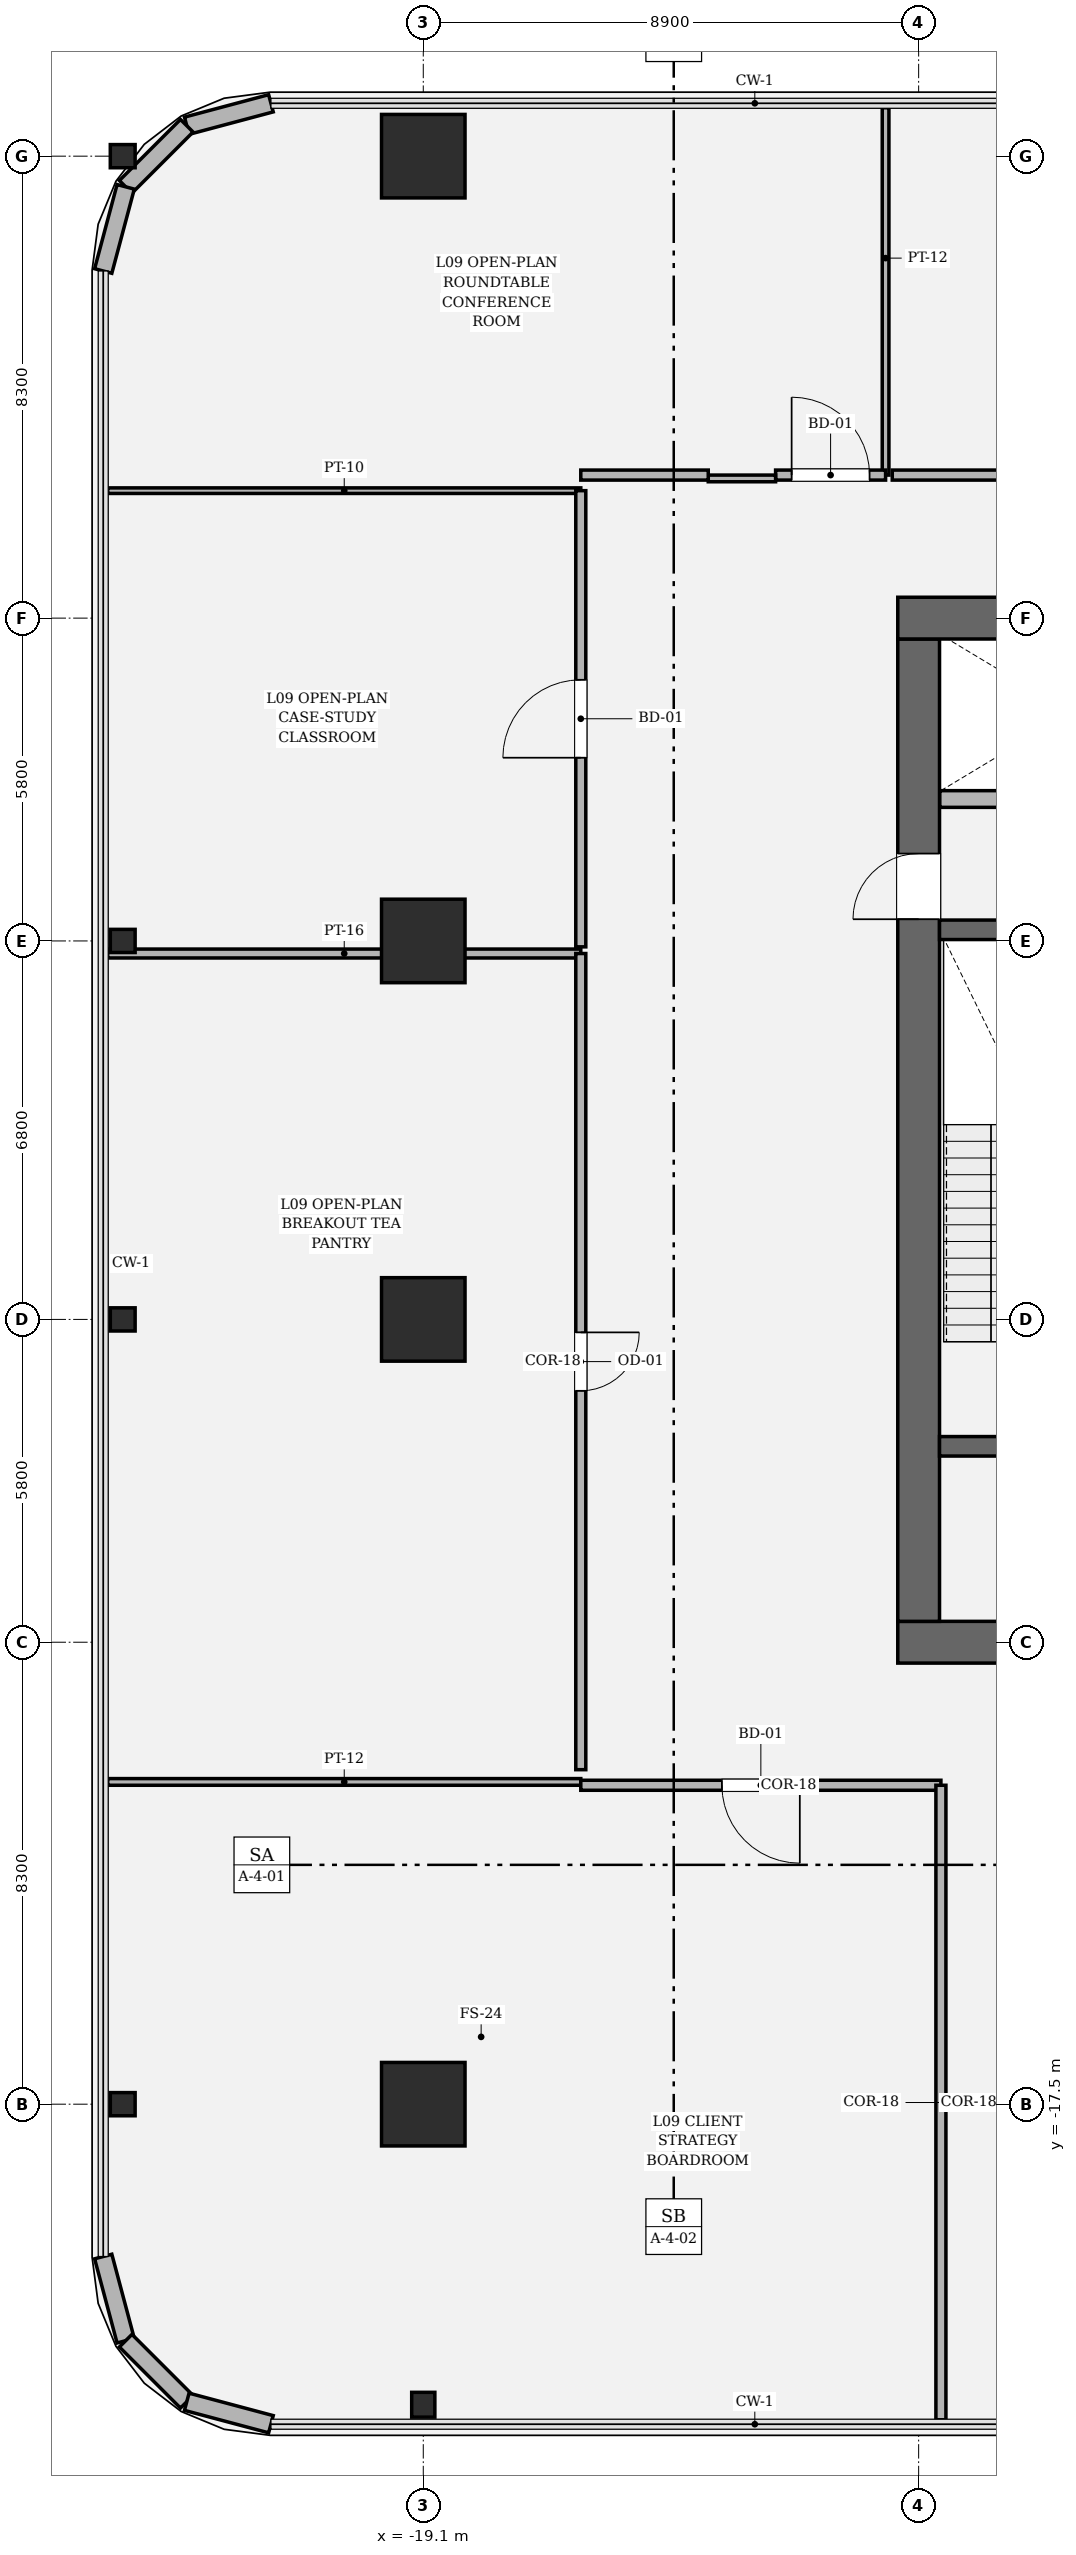
"""IFC4 building model, lengths in metres.
Left out: names, types, materials, properties, quantities, classifications, styles, units other than length and angle.
Written with IfcOpenShell. Run it as: python <this file> out.ifc"""

import sys

from ifc_helpers import new_model, si_unit, direction, frame, frame_2d, origin, origin_2d, place, context, subcontext, project, spatial, rectangle, hollow_rectangle, i_section, extrude, element, fill, save


model = new_model("IFC4")
c1 = context("Model", 3, precision=1e-05, world=origin(), true_north=direction((0.0, 1.0)))
c2 = subcontext(c1, "Body", "Model", "MODEL_VIEW")
j1 = project(units=[si_unit("LENGTHUNIT", "METRE"), si_unit("PLANEANGLEUNIT", "RADIAN")], contexts=[c1])
p1 = place(None, origin())
s1 = spatial("IfcSite", under=j1, at=p1, CompositionType="ELEMENT")
p2 = place(p1, origin())
s2 = spatial("IfcBuilding", under=s1, at=p2, CompositionType="ELEMENT")
p3 = place(p2, frame((0.0, 0.0, 44.4)))
s3 = spatial("IfcBuildingStorey", under=s2, at=p3, CompositionType="ELEMENT", Elevation=44.4)
p4 = place(p3, frame((10.575, -9.2, 0.0), z_axis=(0.0, 0.0, 1.0), x_axis=(-1.0, 0.0, 0.0)))
e1 = element("IfcWall", 1, at=p4, inside=s3, PredefinedType="SHEAR", context=c2, shape_type="SweptSolid", body=[
    extrude(rectangle(XDim=21.15, YDim=0.75, at=frame_2d((10.575, 0.0))), origin(), (0.0, 0.0, 1.0), 4.05),
])
p5 = place(p4, frame((2.85, 0.0, 0.0)))
e2 = element("IfcOpeningElement", 2, at=p5, cuts=e1, PredefinedType="OPENING", context=c2, shape_type="SweptSolid", body=[
    extrude(rectangle(XDim=1.25, YDim=2.25, at=frame_2d((0.625, 1.125))), frame((0.0, 0.385, 0.0), z_axis=(0.0, -1.0, 0.0), x_axis=(1.0, 0.0, 0.0)), (0.0, 0.0, 1.0), 0.77),
])
p6 = place(p4, frame((17.05, 0.0, 0.0)))
e3 = element("IfcOpeningElement", 3, at=p6, cuts=e1, PredefinedType="OPENING", context=c2, shape_type="SweptSolid", body=[
    extrude(rectangle(XDim=1.25, YDim=2.25, at=frame_2d((0.625, 1.125))), frame((0.0, 0.385, 0.0), z_axis=(0.0, -1.0, 0.0), x_axis=(1.0, 0.0, 0.0)), (0.0, 0.0, 1.0), 0.77),
])
p7 = place(p3, frame((-10.2, -8.825, 0.0), z_axis=(0.0, 0.0, 1.0), x_axis=(0.0, 1.0, 0.0)))
e4 = element("IfcWall", 4, at=p7, inside=s3, PredefinedType="SHEAR", context=c2, shape_type="SweptSolid", body=[
    extrude(rectangle(XDim=17.65, YDim=0.75, at=frame_2d((8.825, 0.0))), origin(), (0.0, 0.0, 1.0), 4.05),
])
p8 = place(p7, frame((12.615, 0.0, 0.0)))
e5 = element("IfcOpeningElement", 5, at=p8, cuts=e4, PredefinedType="OPENING", context=c2, shape_type="SweptSolid", body=[
    extrude(rectangle(XDim=1.18, YDim=2.2, at=frame_2d((0.59, 1.1))), frame((0.0, 0.385, 0.0), z_axis=(0.0, -1.0, 0.0), x_axis=(1.0, 0.0, 0.0)), (0.0, 0.0, 1.0), 0.77),
])
p9 = place(p3, frame((-10.575, 9.2, 0.0), z_axis=(0.0, 0.0, 1.0), x_axis=(1.0, 0.0, 0.0)))
e6 = element("IfcWall", 6, at=p9, inside=s3, PredefinedType="SHEAR", context=c2, shape_type="SweptSolid", body=[
    extrude(rectangle(XDim=21.15, YDim=0.75, at=frame_2d((10.575, 0.0))), origin(), (0.0, 0.0, 1.0), 4.05),
])
p10 = place(p3, frame((-9.825, -5.68, 0.0), z_axis=(0.0, 0.0, 1.0), x_axis=(1.0, 0.0, 0.0)))
e7 = element("IfcWall", 7, at=p10, inside=s3, PredefinedType="SOLIDWALL", context=c2, shape_type="SweptSolid", body=[
    extrude(rectangle(XDim=5.175, YDim=0.35, at=frame_2d((2.587, 0.0))), origin(), (0.0, 0.0, 1.0), 4.05),
])
p11 = place(p10, frame((1.285, 0.0, 0.0)))
e8 = element("IfcOpeningElement", 8, at=p11, cuts=e7, PredefinedType="OPENING", context=c2, shape_type="SweptSolid", body=[
    extrude(rectangle(XDim=1.18, YDim=2.2, at=frame_2d((0.59, 1.1))), frame((0.0, 0.185, 0.0), z_axis=(0.0, -1.0, 0.0), x_axis=(1.0, 0.0, 0.0)), (0.0, 0.0, 1.0), 0.37),
])
p12 = place(p3, frame((-9.825, 3.6, 0.0), z_axis=(0.0, 0.0, 1.0), x_axis=(1.0, 0.0, 0.0)))
e9 = element("IfcWall", 9, at=p12, inside=s3, PredefinedType="SOLIDWALL", context=c2, shape_type="SweptSolid", body=[
    extrude(rectangle(XDim=5.175, YDim=0.35, at=frame_2d((2.587, 0.0))), origin(), (0.0, 0.0, 1.0), 4.05),
])
for number, where, z_axis, x_axis in (
    (10, (-19.1, -17.5, 0.0), (0.0, 0.0, 1.0), (1.0, 0.0, 0.0)),
    (11, (-19.1, 17.5, 0.0), (0.0, 0.0, 1.0), (1.0, 0.0, 0.0)),
    (12, (-19.1, 3.4, 0.0), (0.0, 0.0, 1.0), (1.0, 0.0, 0.0)),
    (13, (-19.1, -3.4, 0.0), (0.0, 0.0, 1.0), (1.0, 0.0, 0.0)),
):
    element("IfcColumn", number, at=place(p3, frame(where, z_axis=z_axis, x_axis=x_axis)), inside=s3, PredefinedType="COLUMN", context=c2, shape_type="SweptSolid", body=[
        extrude(hollow_rectangle(XDim=1.5, YDim=1.5, WallThickness=0.045, at=origin_2d()), origin(), (0.0, 0.0, 1.0), 4.05),
    ])
for number, where, z_axis, x_axis in (
    (14, (-19.1, -22.9, 0.0), (0.0, 0.0, 1.0), (1.0, 0.0, 0.0)),
    (15, (-24.5, -17.5, 0.0), (0.0, 0.0, 1.0), (0.0, 1.0, 0.0)),
    (16, (-24.5, -3.4, 0.0), (0.0, 0.0, 1.0), (0.0, 1.0, 0.0)),
    (17, (-24.5, 3.4, 0.0), (0.0, 0.0, 1.0), (0.0, 1.0, 0.0)),
    (18, (-24.5, 17.5, 0.0), (0.0, 0.0, 1.0), (0.0, 1.0, 0.0)),
):
    element("IfcColumn", number, at=place(p3, frame(where, z_axis=z_axis, x_axis=x_axis)), inside=s3, PredefinedType="COLUMN", context=c2, shape_type="SweptSolid", body=[
        extrude(i_section(OverallWidth=0.416, OverallDepth=0.446, WebThickness=0.039, FlangeThickness=0.062, FilletRadius=0.018, at=origin_2d()), origin(), (0.0, 0.0, 1.0), 4.048),
    ])
p13 = place(p3, frame((-21.837, 18.45, 0.0), z_axis=(0.0, 0.0, 1.0), x_axis=(-0.966224582397, -0.257701486942, 0.0)))
e19 = element("IfcWall", 19, at=p13, inside=s3, PredefinedType="SOLIDWALL", context=c2, shape_type="SweptSolid", body=[
    extrude(rectangle(XDim=1.565, YDim=0.32, at=frame_2d((0.783, 0.0))), origin(), (0.0, 0.0, 1.0), 3.81),
])
p14 = place(p3, frame((-23.349, 18.047, 0.0), z_axis=(0.0, 0.0, 1.0), x_axis=(-0.707106781187, -0.707106781187, 0.0)))
e20 = element("IfcWall", 20, at=p14, inside=s3, PredefinedType="SOLIDWALL", context=c2, shape_type="SweptSolid", body=[
    extrude(rectangle(XDim=1.552, YDim=0.32, at=frame_2d((0.776, 0.0))), origin(), (0.0, 0.0, 1.0), 2.484),
])
p15 = place(p3, frame((-24.447, 16.949, 0.0), z_axis=(0.0, 0.0, 1.0), x_axis=(-0.257847112249, -0.966185730957, 0.0)))
e21 = element("IfcWall", 21, at=p15, inside=s3, PredefinedType="SOLIDWALL", context=c2, shape_type="SweptSolid", body=[
    extrude(rectangle(XDim=1.565, YDim=0.32, at=frame_2d((0.783, 0.0))), origin(), (0.0, 0.0, 1.0), 2.524),
])
p16 = place(p3, frame((-24.85, -20.237, 0.0), z_axis=(0.0, 0.0, 1.0), x_axis=(0.257847112249, -0.966185730957, 0.0)))
e22 = element("IfcWall", 22, at=p16, inside=s3, PredefinedType="SOLIDWALL", context=c2, shape_type="SweptSolid", body=[
    extrude(rectangle(XDim=1.565, YDim=0.32, at=frame_2d((0.783, 0.0))), origin(), (0.0, 0.0, 1.0), 3.81),
])
p17 = place(p3, frame((-24.447, -21.749, 0.0), z_axis=(0.0, 0.0, 1.0), x_axis=(0.707028130747, -0.707185422879, 0.0)))
e23 = element("IfcWall", 23, at=p17, inside=s3, PredefinedType="SOLIDWALL", context=c2, shape_type="SweptSolid", body=[
    extrude(rectangle(XDim=1.552, YDim=0.32, at=frame_2d((0.776, 0.0))), origin(), (0.0, 0.0, 1.0), 3.81),
])
p18 = place(p3, frame((-23.349, -22.847, 0.0), z_axis=(0.0, 0.0, 1.0), x_axis=(0.966224582397, -0.257701486942, 0.0)))
e24 = element("IfcWall", 24, at=p18, inside=s3, PredefinedType="SOLIDWALL", context=c2, shape_type="SweptSolid", body=[
    extrude(rectangle(XDim=1.565, YDim=0.32, at=frame_2d((0.783, 0.0))), origin(), (0.0, 0.0, 1.0), 3.81),
])
p19 = place(p3, frame((-9.82, 5.95, 0.0), z_axis=(0.0, 0.0, 1.0), x_axis=(1.0, 0.0, 0.0)))
e25 = element("IfcWall", 25, at=p19, inside=s3, PredefinedType="SOLIDWALL", context=c2, shape_type="SweptSolid", body=[
    extrude(rectangle(XDim=4.76, YDim=0.3, at=frame_2d((2.38, 0.0))), origin(), (0.0, 0.0, 1.0), 3.81),
])
p20 = place(p3, frame((-24.77, -11.71, 0.0), z_axis=(0.0, 0.0, 1.0), x_axis=(1.0, 0.0, 0.0)))
e26 = element("IfcWall", 26, at=p20, inside=s3, PredefinedType="PARTITIONING", context=c2, shape_type="SweptSolid", body=[
    extrude(rectangle(XDim=8.5, YDim=0.12, at=frame_2d((4.25, 0.0))), origin(), (0.0, 0.0, 1.0), 2.524),
])
p21 = place(p3, frame((-16.27, -11.77, 0.0), z_axis=(0.0, 0.0, 1.0), x_axis=(1.0, 0.0, 0.0)))
e27 = element("IfcWall", 27, at=p21, inside=s3, PredefinedType="PARTITIONING", context=c2, shape_type="SweptSolid", body=[
    extrude(rectangle(XDim=6.47, YDim=0.18, at=frame_2d((3.235, 0.0))), origin(), (0.0, 0.0, 1.0), 3.104),
])
p22 = place(p21, frame((2.535, 0.0, 0.0)))
e28 = element("IfcOpeningElement", 28, at=p22, cuts=e27, PredefinedType="OPENING", context=c2, shape_type="SweptSolid", body=[
    extrude(rectangle(XDim=1.4, YDim=2.25, at=frame_2d((0.7, 1.125))), frame((0.0, 0.1, 0.0), z_axis=(0.0, -1.0, 0.0), x_axis=(1.0, 0.0, 0.0)), (0.0, 0.0, 1.0), 0.2),
])
p23 = place(p3, frame((-9.8, -11.77, 0.0), z_axis=(0.0, 0.0, 1.0), x_axis=(0.0, -1.0, 0.0)))
e29 = element("IfcWall", 29, at=p23, inside=s3, PredefinedType="PARTITIONING", context=c2, shape_type="SweptSolid", body=[
    extrude(rectangle(XDim=11.4, YDim=0.18, at=frame_2d((5.7, 0.0))), origin(), (0.0, 0.0, 1.0), 2.524),
])
p24 = place(p3, frame((-24.77, 3.174, 0.0), z_axis=(0.0, 0.0, 1.0), x_axis=(1.0, 0.0, 0.0)))
e30 = element("IfcWall", 30, at=p24, inside=s3, PredefinedType="PARTITIONING", context=c2, shape_type="SweptSolid", body=[
    extrude(rectangle(XDim=8.5, YDim=0.16, at=frame_2d((4.25, 0.0))), origin(), (0.0, 0.0, 1.0), 2.484),
])
p25 = place(p3, frame((-16.27, 3.174, 0.0), z_axis=(0.0, 0.0, 1.0), x_axis=(0.0, -1.0, 0.0)))
e31 = element("IfcWall", 31, at=p25, inside=s3, PredefinedType="PARTITIONING", context=c2, shape_type="SweptSolid", body=[
    extrude(rectangle(XDim=14.664, YDim=0.18, at=frame_2d((7.332, 0.0))), origin(), (0.0, 0.0, 1.0), 3.104),
])
p26 = place(p25, frame((6.807, 0.0, 0.0)))
e32 = element("IfcOpeningElement", 32, at=p26, cuts=e31, PredefinedType="OPENING", context=c2, shape_type="SweptSolid", body=[
    extrude(rectangle(XDim=1.05, YDim=2.2, at=frame_2d((0.525, 1.1))), frame((0.0, 0.1, 0.0), z_axis=(0.0, -1.0, 0.0), x_axis=(1.0, 0.0, 0.0)), (0.0, 0.0, 1.0), 0.2),
])
p27 = place(p3, frame((-24.77, 11.49, 0.0), z_axis=(0.0, 0.0, 1.0), x_axis=(1.0, 0.0, 0.0)))
e33 = element("IfcWall", 33, at=p27, inside=s3, PredefinedType="PARTITIONING", context=c2, shape_type="SweptSolid", body=[
    extrude(rectangle(XDim=8.5, YDim=0.1, at=frame_2d((4.25, 0.0))), origin(), (0.0, 0.0, 1.0), 2.524),
])
p28 = place(p3, frame((-16.27, 11.49, 0.0), z_axis=(0.0, 0.0, 1.0), x_axis=(0.0, -1.0, 0.0)))
e34 = element("IfcWall", 34, at=p28, inside=s3, PredefinedType="PARTITIONING", context=c2, shape_type="SweptSolid", body=[
    extrude(rectangle(XDim=8.196, YDim=0.18, at=frame_2d((4.098, 0.0))), origin(), (0.0, 0.0, 1.0), 3.104),
])
p29 = place(p28, frame((3.398, 0.0, 0.0)))
e35 = element("IfcOpeningElement", 35, at=p29, cuts=e34, PredefinedType="OPENING", context=c2, shape_type="SweptSolid", body=[
    extrude(rectangle(XDim=1.4, YDim=2.25, at=frame_2d((0.7, 1.125))), frame((0.0, 0.1, 0.0), z_axis=(0.0, -1.0, 0.0), x_axis=(1.0, 0.0, 0.0)), (0.0, 0.0, 1.0), 0.2),
])
p30 = place(p3, frame((-10.794, 18.37, 0.0), z_axis=(0.0, 0.0, 1.0), x_axis=(0.0, -1.0, 0.0)))
e36 = element("IfcWall", 36, at=p30, inside=s3, PredefinedType="PARTITIONING", context=c2, shape_type="SweptSolid", body=[
    extrude(rectangle(XDim=6.6, YDim=0.12, at=frame_2d((3.3, 0.0))), origin(), (0.0, 0.0, 1.0), 3.104),
])
p31 = place(p3, frame((-10.794, 11.77, 0.0), z_axis=(0.0, 0.0, 1.0), x_axis=(-1.0, 0.0, 0.0)))
e37 = element("IfcWall", 37, at=p31, inside=s3, PredefinedType="PARTITIONING", context=c2, shape_type="SweptSolid", body=[
    extrude(rectangle(XDim=1.976, YDim=0.18, at=frame_2d((0.988, 0.0))), origin(), (0.0, 0.0, 1.0), 3.81),
])
p32 = place(p31, frame((0.288, 0.0, 0.0)))
e38 = element("IfcOpeningElement", 38, at=p32, cuts=e37, PredefinedType="OPENING", context=c2, shape_type="SweptSolid", body=[
    extrude(rectangle(XDim=1.4, YDim=2.25, at=frame_2d((0.7, 1.125))), frame((0.0, 0.1, 0.0), z_axis=(0.0, -1.0, 0.0), x_axis=(1.0, 0.0, 0.0)), (0.0, 0.0, 1.0), 0.2),
])
p33 = place(p3, frame((-12.77, 11.71, 0.0), z_axis=(0.0, 0.0, 1.0), x_axis=(-1.0, 0.0, 0.0)))
e39 = element("IfcWall", 39, at=p33, inside=s3, PredefinedType="PARTITIONING", context=c2, shape_type="SweptSolid", body=[
    extrude(rectangle(XDim=1.21, YDim=0.12, at=frame_2d((0.605, 0.0))), origin(), (0.0, 0.0, 1.0), 3.81),
])
p34 = place(p3, frame((-13.98, 11.77, 0.0), z_axis=(0.0, 0.0, 1.0), x_axis=(-1.0, 0.0, 0.0)))
e40 = element("IfcWall", 40, at=p34, inside=s3, PredefinedType="PARTITIONING", context=c2, shape_type="SweptSolid", body=[
    extrude(rectangle(XDim=2.29, YDim=0.18, at=frame_2d((1.145, 0.0))), origin(), (0.0, 0.0, 1.0), 3.354),
])
p35 = place(p3, frame((7.4, 11.77, 0.0), z_axis=(0.0, 0.0, 1.0), x_axis=(-1.0, 0.0, 0.0)))
e41 = element("IfcWall", 41, at=p35, inside=s3, PredefinedType="PARTITIONING", context=c2, shape_type="SweptSolid", body=[
    extrude(rectangle(XDim=18.074, YDim=0.18, at=frame_2d((9.037, 0.0))), origin(), (0.0, 0.0, 1.0), 3.104),
])
p36 = place(p8, origin())
e42 = element("IfcDoor", 42, at=p36, inside=s3, OperationType="SINGLE_SWING_LEFT", PredefinedType="DOOR", context=c2, shape_type="SweptSolid", body=[
    extrude(rectangle(XDim=1.18, YDim=2.2, at=frame_2d((0.59, 1.1))), frame((0.0, 0.025, 0.0), z_axis=(0.0, -1.0, 0.0), x_axis=(1.0, 0.0, 0.0)), (0.0, 0.0, 1.0), 0.05),
])
fill(e5, e42)
p37 = place(p22, origin())
e43 = element("IfcDoor", 43, at=p37, inside=s3, OperationType="SINGLE_SWING_RIGHT", PredefinedType="DOOR", context=c2, shape_type="SweptSolid", body=[
    extrude(rectangle(XDim=1.4, YDim=2.25, at=frame_2d((0.7, 1.125))), frame((0.0, 0.025, 0.0), z_axis=(0.0, -1.0, 0.0), x_axis=(1.0, 0.0, 0.0)), (0.0, 0.0, 1.0), 0.05),
])
fill(e28, e43)
p38 = place(p26, origin())
e44 = element("IfcDoor", 44, at=p38, inside=s3, OperationType="SINGLE_SWING_LEFT", PredefinedType="DOOR", context=c2, shape_type="SweptSolid", body=[
    extrude(rectangle(XDim=1.05, YDim=2.2, at=frame_2d((0.525, 1.1))), frame((0.0, 0.025, 0.0), z_axis=(0.0, -1.0, 0.0), x_axis=(1.0, 0.0, 0.0)), (0.0, 0.0, 1.0), 0.05),
])
fill(e32, e44)
p39 = place(p29, origin())
e45 = element("IfcDoor", 45, at=p39, inside=s3, OperationType="SINGLE_SWING_RIGHT", PredefinedType="DOOR", context=c2, shape_type="SweptSolid", body=[
    extrude(rectangle(XDim=1.4, YDim=2.25, at=frame_2d((0.7, 1.125))), frame((0.0, 0.025, 0.0), z_axis=(0.0, -1.0, 0.0), x_axis=(1.0, 0.0, 0.0)), (0.0, 0.0, 1.0), 0.05),
])
fill(e35, e45)
p40 = place(p32, origin())
e46 = element("IfcDoor", 46, at=p40, inside=s3, OperationType="SINGLE_SWING_RIGHT", PredefinedType="DOOR", context=c2, shape_type="SweptSolid", body=[
    extrude(rectangle(XDim=1.4, YDim=2.25, at=frame_2d((0.7, 1.125))), frame((0.0, 0.025, 0.0), z_axis=(0.0, -1.0, 0.0), x_axis=(1.0, 0.0, 0.0)), (0.0, 0.0, 1.0), 0.05),
])
fill(e38, e46)
save(model, sys.argv[1])
